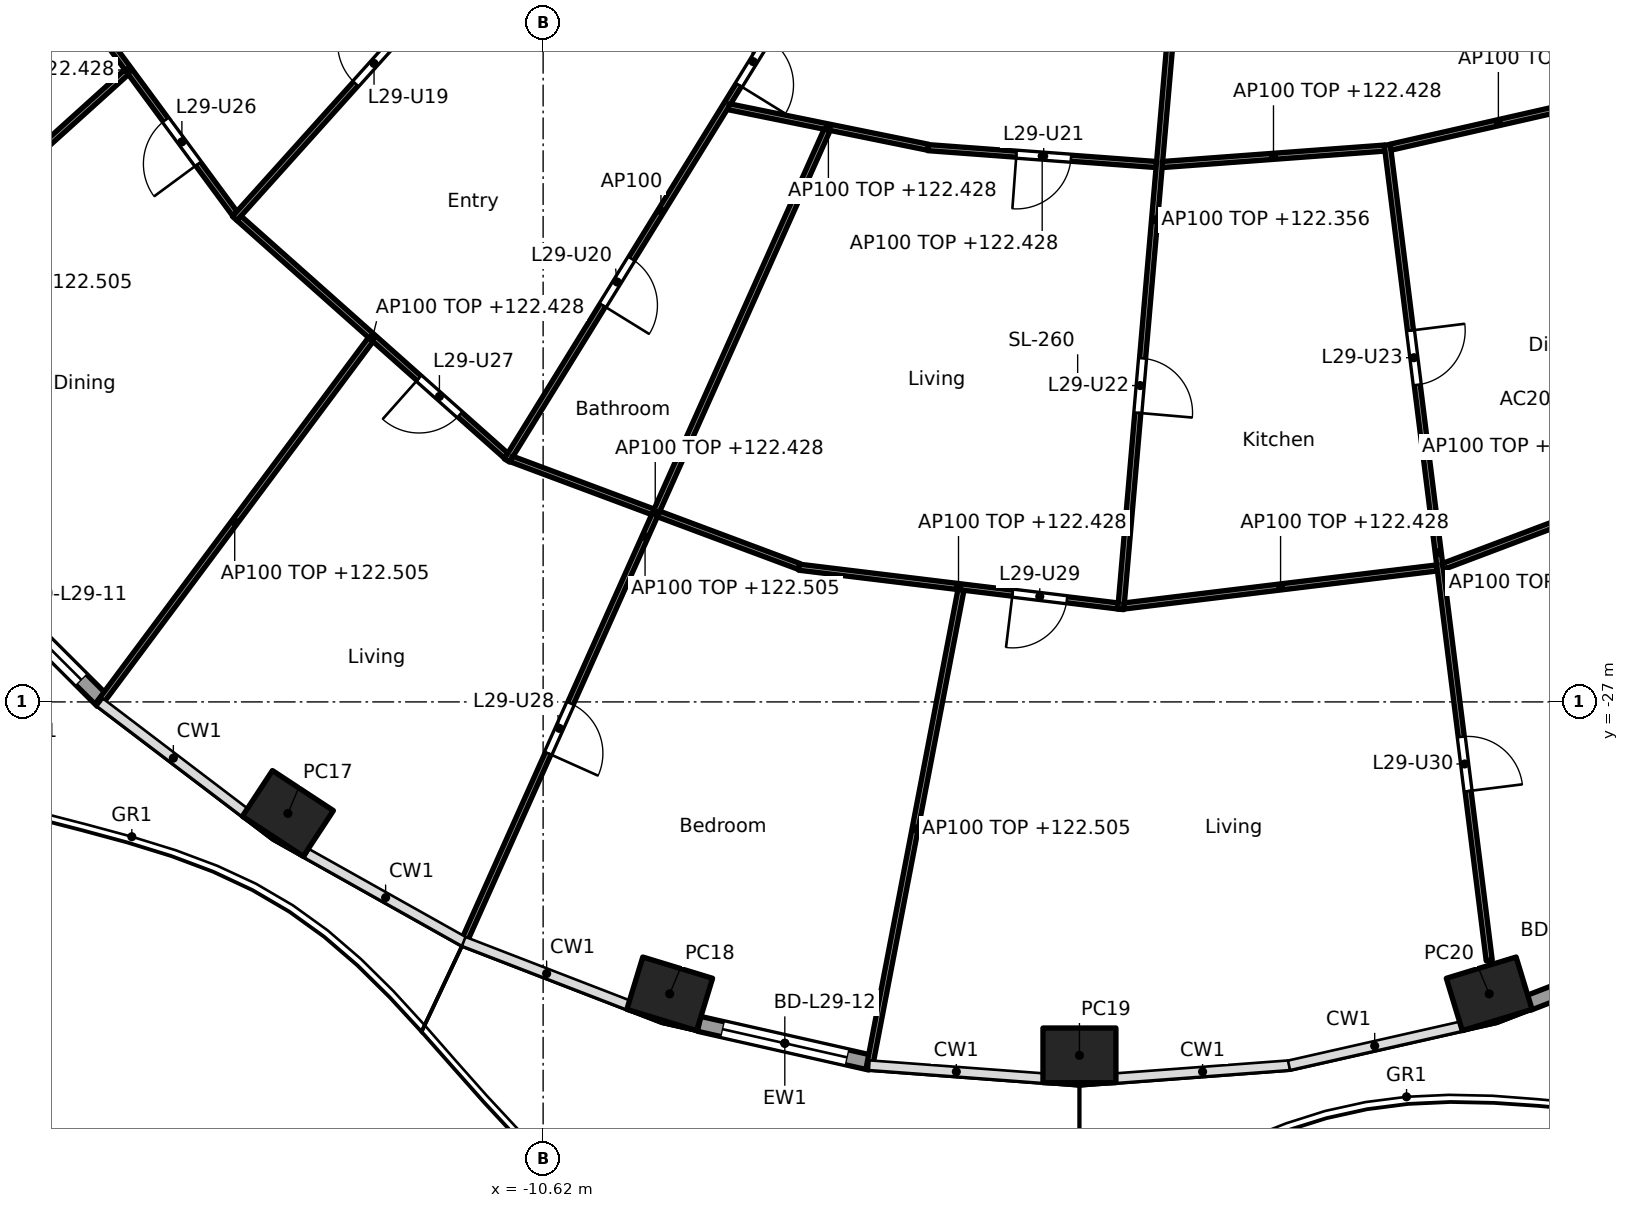
"""IFC4 building model, lengths in metres.
Left out: names, types, materials, properties, quantities, classifications, styles, units other than length and angle.
Written with IfcOpenShell. Run it as: python <this file> out.ifc"""

import sys

from ifc_helpers import new_model, si_unit, direction, frame, frame_2d, origin, origin_2d, place, context, subcontext, project, spatial, rectangle, hollow_rectangle, extrude, element, fill, save


model = new_model("IFC4")
c1 = context("Model", 3, precision=1e-05, world=origin(), true_north=direction((0.0, 1.0)))
c2 = subcontext(c1, "Body", "Model", "MODEL_VIEW")
j1 = project(units=[si_unit("LENGTHUNIT", "METRE"), si_unit("PLANEANGLEUNIT", "RADIAN")], contexts=[c1])
p1 = place(None, origin())
s1 = spatial("IfcSite", under=j1, at=p1, CompositionType="ELEMENT")
p2 = place(p1, origin())
s2 = spatial("IfcBuilding", under=s1, at=p2, CompositionType="ELEMENT")
p3 = place(p2, frame((0.0, 0.0, 119.6)))
s3 = spatial("IfcBuildingStorey", under=s2, at=p3, CompositionType="ELEMENT", Elevation=119.6)
for number, where, z_axis, x_axis in (
    (1, (-14.817, -28.834, -0.26), (0.0, 0.0, 1.0), (0.836, -0.549, 0.0)),
    (2, (-8.538, -31.801, -0.26), (0.0, 0.0, 1.0), (0.957, -0.292, 0.0)),
    (3, (-1.8, -32.813, -0.26), (0.0, 0.0, 1.0), (1.0, 0.0, 0.0)),
    (4, (4.938, -31.801, -0.26), (0.0, 0.0, 1.0), (0.957, 0.292, 0.0)),
):
    element("IfcColumn", number, at=place(p3, frame(where, z_axis=z_axis, x_axis=x_axis)), inside=s3, PredefinedType="COLUMN", context=c2, shape_type="SweptSolid", body=[
        extrude(hollow_rectangle(XDim=1.2, YDim=0.9, WallThickness=0.04, at=origin_2d()), origin(), (0.0, 0.0, 1.0), 3.96),
    ])
p4 = place(p3, frame((-17.865, -26.985, 0.0), z_axis=(0.0, 0.0, 1.0), x_axis=(-0.707818274975, 0.706394570768, 0.0)))
e5 = element("IfcWall", 5, at=p4, inside=s3, PredefinedType="SOLIDWALL", context=c2, shape_type="SweptSolid", body=[
    extrude(rectangle(XDim=3.087, YDim=0.25, at=frame_2d((1.543, 0.0))), origin(), (0.0, 0.0, 1.0), 3.44),
])
p5 = place(p4, frame((0.493, 0.0, 0.0)))
e6 = element("IfcOpeningElement", 6, at=p5, cuts=e5, PredefinedType="OPENING", context=c2, shape_type="SweptSolid", body=[
    extrude(rectangle(XDim=2.1, YDim=2.4, at=frame_2d((1.05, 1.2))), frame((0.0, 0.135, 0.0), z_axis=(0.0, -1.0, 0.0), x_axis=(1.0, 0.0, 0.0)), (0.0, 0.0, 1.0), 0.27),
])
p6 = place(p3, frame((-5.236, -32.932, 0.0), z_axis=(0.0, 0.0, 1.0), x_axis=(-0.975339035722, 0.220711951186, 0.0)))
e7 = element("IfcWall", 7, at=p6, inside=s3, PredefinedType="SOLIDWALL", context=c2, shape_type="SweptSolid", body=[
    extrude(rectangle(XDim=2.89, YDim=0.25, at=frame_2d((1.445, 0.0))), origin(), (0.0, 0.0, 1.0), 3.44),
])
p7 = place(p6, frame((0.395, 0.0, 0.0)))
e8 = element("IfcOpeningElement", 8, at=p7, cuts=e7, PredefinedType="OPENING", context=c2, shape_type="SweptSolid", body=[
    extrude(rectangle(XDim=2.1, YDim=2.4, at=frame_2d((1.05, 1.2))), frame((0.0, 0.135, 0.0), z_axis=(0.0, -1.0, 0.0), x_axis=(1.0, 0.0, 0.0)), (0.0, 0.0, 1.0), 0.27),
])
p8 = place(p3, frame((8.31, -30.898, 0.0), z_axis=(0.0, 0.0, 1.0), x_axis=(-0.932845344347, -0.360277064952, 0.0)))
e9 = element("IfcWall", 9, at=p8, inside=s3, PredefinedType="SOLIDWALL", context=c2, shape_type="SweptSolid", body=[
    extrude(rectangle(XDim=2.923, YDim=0.25, at=frame_2d((1.462, 0.0))), origin(), (0.0, 0.0, 1.0), 3.44),
])
p9 = place(p8, frame((0.412, 0.0, 0.0)))
e10 = element("IfcOpeningElement", 10, at=p9, cuts=e9, PredefinedType="OPENING", context=c2, shape_type="SweptSolid", body=[
    extrude(rectangle(XDim=2.1, YDim=2.4, at=frame_2d((1.05, 1.2))), frame((0.0, 0.135, 0.0), z_axis=(0.0, -1.0, 0.0), x_axis=(1.0, 0.0, 0.0)), (0.0, 0.0, 1.0), 0.27),
])
p10 = place(p3, frame((-19.176, -14.244, 0.0), z_axis=(0.0, 0.0, 1.0), x_axis=(0.593532053206, -0.80481035146, 0.0)))
e11 = element("IfcWall", 11, at=p10, inside=s3, PredefinedType="PARTITIONING", context=c2, shape_type="SweptSolid", body=[
    extrude(rectangle(XDim=5.876, YDim=0.1, at=frame_2d((2.938, 0.0))), origin(), (0.0, 0.0, 1.0), 2.828),
])
p11 = place(p10, frame((3.957, 0.0, 0.0)))
e12 = element("IfcOpeningElement", 12, at=p11, cuts=e11, PredefinedType="OPENING", context=c2, shape_type="SweptSolid", body=[
    extrude(rectangle(XDim=0.9, YDim=2.1, at=frame_2d((0.45, 1.05))), frame((0.0, 0.06, 0.0), z_axis=(0.0, -1.0, 0.0), x_axis=(1.0, 0.0, 0.0)), (0.0, 0.0, 1.0), 0.12),
])
p12 = place(p3, frame((-17.47, -16.642, 0.0), z_axis=(0.0, 0.0, 1.0), x_axis=(-0.742345465337, -0.670017320742, 0.0)))
e13 = element("IfcWall", 13, at=p12, inside=s3, PredefinedType="PARTITIONING", context=c2, shape_type="SweptSolid", body=[
    extrude(rectangle(XDim=7.21, YDim=0.1, at=frame_2d((3.605, 0.0))), origin(), (0.0, 0.0, 1.0), 2.905),
])
p13 = place(p3, frame((-7.725, -10.186, 0.0), z_axis=(0.0, 0.0, 1.0), x_axis=(-0.668498346565, -0.743713628112, 0.0)))
e14 = element("IfcWall", 14, at=p13, inside=s3, PredefinedType="PARTITIONING", context=c2, shape_type="SweptSolid", body=[
    extrude(rectangle(XDim=11.919, YDim=0.1, at=frame_2d((5.959, 0.0))), origin(), (0.0, 0.0, 1.0), 2.756),
])
p14 = place(p13, frame((2.106, 0.0, 0.0)))
e15 = element("IfcOpeningElement", 15, at=p14, cuts=e14, PredefinedType="OPENING", context=c2, shape_type="SweptSolid", body=[
    extrude(rectangle(XDim=0.9, YDim=2.1, at=frame_2d((0.45, 1.05))), frame((0.0, 0.06, 0.0), z_axis=(0.0, -1.0, 0.0), x_axis=(1.0, 0.0, 0.0)), (0.0, 0.0, 1.0), 0.12),
])
p15 = place(p13, frame((8.041, 0.0, 0.0)))
e16 = element("IfcOpeningElement", 16, at=p15, cuts=e14, PredefinedType="OPENING", context=c2, shape_type="SweptSolid", body=[
    extrude(rectangle(XDim=0.9, YDim=2.1, at=frame_2d((0.45, 1.05))), frame((0.0, 0.06, 0.0), z_axis=(0.0, -1.0, 0.0), x_axis=(1.0, 0.0, 0.0)), (0.0, 0.0, 1.0), 0.12),
])
p16 = place(p3, frame((-15.622, -19.046, 0.0), z_axis=(0.0, 0.0, 1.0), x_axis=(0.747342891849, -0.664438561496, 0.0)))
e17 = element("IfcWall", 17, at=p16, inside=s3, PredefinedType="PARTITIONING", context=c2, shape_type="SweptSolid", body=[
    extrude(rectangle(XDim=5.881, YDim=0.1, at=frame_2d((2.94, 0.0))), origin(), (0.0, 0.0, 1.0), 2.828),
])
p17 = place(p16, frame((3.961, 0.0, 0.0)))
e18 = element("IfcOpeningElement", 18, at=p17, cuts=e17, PredefinedType="OPENING", context=c2, shape_type="SweptSolid", body=[
    extrude(rectangle(XDim=0.9, YDim=2.1, at=frame_2d((0.45, 1.05))), frame((0.0, 0.06, 0.0), z_axis=(0.0, -1.0, 0.0), x_axis=(1.0, 0.0, 0.0)), (0.0, 0.0, 1.0), 0.12),
])
p18 = place(p3, frame((-13.454, -21.04, 0.0), z_axis=(0.0, 0.0, 1.0), x_axis=(-0.597848033124, -0.801609461826, 0.0)))
e19 = element("IfcWall", 19, at=p18, inside=s3, PredefinedType="PARTITIONING", context=c2, shape_type="SweptSolid", body=[
    extrude(rectangle(XDim=7.486, YDim=0.1, at=frame_2d((3.743, 0.0))), origin(), (0.0, 0.0, 1.0), 2.905),
])
p19 = place(p3, frame((-6.149, -14.825, 0.0), z_axis=(0.0, 0.0, 1.0), x_axis=(-0.525396393596, -0.850857584791, 0.0)))
e20 = element("IfcWall", 20, at=p19, inside=s3, PredefinedType="PARTITIONING", context=c2, shape_type="SweptSolid", body=[
    extrude(rectangle(XDim=9.643, YDim=0.1, at=frame_2d((4.822, 0.0))), origin(), (0.0, 0.0, 1.0), 3.44),
])
p20 = place(p19, frame((1.485, 0.0, 0.0)))
e21 = element("IfcOpeningElement", 21, at=p20, cuts=e20, PredefinedType="OPENING", context=c2, shape_type="SweptSolid", body=[
    extrude(rectangle(XDim=0.9, YDim=2.1, at=frame_2d((0.45, 1.05))), frame((0.0, 0.06, 0.0), z_axis=(0.0, -1.0, 0.0), x_axis=(1.0, 0.0, 0.0)), (0.0, 0.0, 1.0), 0.12),
])
p21 = place(p19, frame((5.744, 0.0, 0.0)))
e22 = element("IfcOpeningElement", 22, at=p21, cuts=e20, PredefinedType="OPENING", context=c2, shape_type="SweptSolid", body=[
    extrude(rectangle(XDim=0.9, YDim=2.1, at=frame_2d((0.45, 1.05))), frame((0.0, 0.06, 0.0), z_axis=(0.0, -1.0, 0.0), x_axis=(1.0, 0.0, 0.0)), (0.0, 0.0, 1.0), 0.12),
])
p22 = place(p3, frame((-7.568, -17.212, 0.0), z_axis=(0.0, 0.0, 1.0), x_axis=(0.979967079473, -0.199159541946, 0.0)))
e23 = element("IfcWall", 23, at=p22, inside=s3, PredefinedType="PARTITIONING", context=c2, shape_type="SweptSolid", body=[
    extrude(rectangle(XDim=3.347, YDim=0.1, at=frame_2d((1.673, 0.0))), origin(), (0.0, 0.0, 1.0), 2.828),
])
p23 = place(p3, frame((-11.143, -23.004, 0.0), z_axis=(0.0, 0.0, 1.0), x_axis=(0.936721765635, -0.350074754567, 0.0)))
e24 = element("IfcWall", 24, at=p23, inside=s3, PredefinedType="PARTITIONING", context=c2, shape_type="SweptSolid", body=[
    extrude(rectangle(XDim=5.053, YDim=0.1, at=frame_2d((2.526, 0.0))), origin(), (0.0, 0.0, 1.0), 2.828),
])
p24 = place(p3, frame((-5.949, -17.591, 0.0), z_axis=(0.0, 0.0, 1.0), x_axis=(-0.40838467696, -0.912809923053, 0.0)))
e25 = element("IfcWall", 25, at=p24, inside=s3, PredefinedType="PARTITIONING", context=c2, shape_type="SweptSolid", body=[
    extrude(rectangle(XDim=14.665, YDim=0.1, at=frame_2d((7.333, 0.0))), origin(), (0.0, 0.0, 1.0), 2.905),
])
p25 = place(p24, frame((10.334, 0.0, 0.0)))
e26 = element("IfcOpeningElement", 26, at=p25, cuts=e25, PredefinedType="OPENING", context=c2, shape_type="SweptSolid", body=[
    extrude(rectangle(XDim=0.9, YDim=2.1, at=frame_2d((0.45, 1.05))), frame((0.0, 0.06, 0.0), z_axis=(0.0, -1.0, 0.0), x_axis=(1.0, 0.0, 0.0)), (0.0, 0.0, 1.0), 0.12),
])
p26 = place(p3, frame((-4.29, -17.885, 0.0), z_axis=(0.0, 0.0, 1.0), x_axis=(0.997272353708, -0.073809569363, 0.0)))
e27 = element("IfcWall", 27, at=p26, inside=s3, PredefinedType="PARTITIONING", context=c2, shape_type="SweptSolid", body=[
    extrude(rectangle(XDim=3.764, YDim=0.1, at=frame_2d((1.882, 0.0))), origin(), (0.0, 0.0, 1.0), 2.828),
])
p27 = place(p26, frame((1.457, 0.0, 0.0)))
e28 = element("IfcOpeningElement", 28, at=p27, cuts=e27, PredefinedType="OPENING", context=c2, shape_type="SweptSolid", body=[
    extrude(rectangle(XDim=0.9, YDim=2.1, at=frame_2d((0.45, 1.05))), frame((0.0, 0.06, 0.0), z_axis=(0.0, -1.0, 0.0), x_axis=(1.0, 0.0, 0.0)), (0.0, 0.0, 1.0), 0.12),
])
p28 = place(p3, frame((-6.413, -24.784, 0.0), z_axis=(0.0, 0.0, 1.0), x_axis=(0.992690077723, -0.120691381588, 0.0)))
e29 = element("IfcWall", 29, at=p28, inside=s3, PredefinedType="PARTITIONING", context=c2, shape_type="SweptSolid", body=[
    extrude(rectangle(XDim=5.286, YDim=0.1, at=frame_2d((2.643, 0.0))), origin(), (0.0, 0.0, 1.0), 2.828),
])
p29 = place(p28, frame((3.539, 0.0, 0.0)))
e30 = element("IfcOpeningElement", 30, at=p29, cuts=e29, PredefinedType="OPENING", context=c2, shape_type="SweptSolid", body=[
    extrude(rectangle(XDim=0.9, YDim=2.1, at=frame_2d((0.45, 1.05))), frame((0.0, 0.06, 0.0), z_axis=(0.0, -1.0, 0.0), x_axis=(1.0, 0.0, 0.0)), (0.0, 0.0, 1.0), 0.12),
])
p30 = place(p3, frame((-3.749, -25.159, 0.0), z_axis=(0.0, 0.0, 1.0), x_axis=(-0.188392334675, -0.982093848996, 0.0)))
e31 = element("IfcWall", 31, at=p30, inside=s3, PredefinedType="PARTITIONING", context=c2, shape_type="SweptSolid", body=[
    extrude(rectangle(XDim=8.0, YDim=0.1, at=frame_2d((4.0, 0.0))), origin(), (0.0, 0.0, 1.0), 2.905),
])
p31 = place(p3, frame((-0.009, -12.664, 0.0), z_axis=(0.0, 0.0, 1.0), x_axis=(-0.086441225464, -0.996256952066, 0.0)))
e32 = element("IfcWall", 32, at=p31, inside=s3, PredefinedType="PARTITIONING", context=c2, shape_type="SweptSolid", body=[
    extrude(rectangle(XDim=12.862, YDim=0.1, at=frame_2d((6.431, 0.0))), origin(), (0.0, 0.0, 1.0), 2.756),
])
p32 = place(p31, frame((2.312, 0.0, 0.0)))
e33 = element("IfcOpeningElement", 33, at=p32, cuts=e32, PredefinedType="OPENING", context=c2, shape_type="SweptSolid", body=[
    extrude(rectangle(XDim=0.9, YDim=2.1, at=frame_2d((0.45, 1.05))), frame((0.0, 0.06, 0.0), z_axis=(0.0, -1.0, 0.0), x_axis=(1.0, 0.0, 0.0)), (0.0, 0.0, 1.0), 0.12),
])
p33 = place(p31, frame((8.718, 0.0, 0.0)))
e34 = element("IfcOpeningElement", 34, at=p33, cuts=e32, PredefinedType="OPENING", context=c2, shape_type="SweptSolid", body=[
    extrude(rectangle(XDim=0.9, YDim=2.1, at=frame_2d((0.45, 1.05))), frame((0.0, 0.06, 0.0), z_axis=(0.0, -1.0, 0.0), x_axis=(1.0, 0.0, 0.0)), (0.0, 0.0, 1.0), 0.12),
])
p34 = place(p3, frame((-0.436, -18.163, 0.0), z_axis=(0.0, 0.0, 1.0), x_axis=(0.997271025958, 0.073827506966, 0.0)))
e35 = element("IfcWall", 35, at=p34, inside=s3, PredefinedType="PARTITIONING", context=c2, shape_type="SweptSolid", body=[
    extrude(rectangle(XDim=3.664, YDim=0.1, at=frame_2d((1.832, 0.0))), origin(), (0.0, 0.0, 1.0), 2.828),
])
p35 = place(p3, frame((-1.066, -25.422, 0.0), z_axis=(0.0, 0.0, 1.0), x_axis=(0.992692993044, 0.120667400577, 0.0)))
e36 = element("IfcWall", 36, at=p35, inside=s3, PredefinedType="PARTITIONING", context=c2, shape_type="SweptSolid", body=[
    extrude(rectangle(XDim=5.186, YDim=0.1, at=frame_2d((2.593, 0.0))), origin(), (0.0, 0.0, 1.0), 2.828),
])
p36 = place(p3, frame((3.262, -17.839, 0.0), z_axis=(0.0, 0.0, 1.0), x_axis=(0.124074750982, -0.992272873845, 0.0)))
e37 = element("IfcWall", 37, at=p36, inside=s3, PredefinedType="PARTITIONING", context=c2, shape_type="SweptSolid", body=[
    extrude(rectangle(XDim=13.516, YDim=0.1, at=frame_2d((6.758, 0.0))), origin(), (0.0, 0.0, 1.0), 2.828),
])
p37 = place(p36, frame((3.078, 0.0, 0.0)))
e38 = element("IfcOpeningElement", 38, at=p37, cuts=e37, PredefinedType="OPENING", context=c2, shape_type="SweptSolid", body=[
    extrude(rectangle(XDim=0.9, YDim=2.1, at=frame_2d((0.45, 1.05))), frame((0.0, 0.06, 0.0), z_axis=(0.0, -1.0, 0.0), x_axis=(1.0, 0.0, 0.0)), (0.0, 0.0, 1.0), 0.12),
])
p38 = place(p36, frame((9.811, 0.0, 0.0)))
e39 = element("IfcOpeningElement", 39, at=p38, cuts=e37, PredefinedType="OPENING", context=c2, shape_type="SweptSolid", body=[
    extrude(rectangle(XDim=0.9, YDim=2.1, at=frame_2d((0.45, 1.05))), frame((0.0, 0.06, 0.0), z_axis=(0.0, -1.0, 0.0), x_axis=(1.0, 0.0, 0.0)), (0.0, 0.0, 1.0), 0.12),
])
p39 = place(p3, frame((3.317, -17.878, 0.0), z_axis=(0.0, 0.0, 1.0), x_axis=(0.975095905288, 0.221783623135, 0.0)))
e40 = element("IfcWall", 40, at=p39, inside=s3, PredefinedType="PARTITIONING", context=c2, shape_type="SweptSolid", body=[
    extrude(rectangle(XDim=3.636, YDim=0.1, at=frame_2d((1.818, 0.0))), origin(), (0.0, 0.0, 1.0), 2.828),
])
p40 = place(p3, frame((4.178, -24.773, 0.0), z_axis=(0.0, 0.0, 1.0), x_axis=(0.935583811437, 0.353104703702, 0.0)))
e41 = element("IfcWall", 41, at=p40, inside=s3, PredefinedType="PARTITIONING", context=c2, shape_type="SweptSolid", body=[
    extrude(rectangle(XDim=5.184, YDim=0.1, at=frame_2d((2.592, 0.0))), origin(), (0.0, 0.0, 1.0), 2.828),
])
p41 = place(p5, origin())
e42 = element("IfcDoor", 42, at=p41, inside=s3, OperationType="SLIDING_TO_LEFT", PredefinedType="DOOR", context=c2, shape_type="SweptSolid", body=[
    extrude(rectangle(XDim=2.1, YDim=2.4, at=frame_2d((1.05, 1.2))), frame((0.0, 0.025, 0.0), z_axis=(0.0, -1.0, 0.0), x_axis=(1.0, 0.0, 0.0)), (0.0, 0.0, 1.0), 0.05),
])
fill(e6, e42)
p42 = place(p7, origin())
e43 = element("IfcDoor", 43, at=p42, inside=s3, OperationType="SLIDING_TO_LEFT", PredefinedType="DOOR", context=c2, shape_type="SweptSolid", body=[
    extrude(rectangle(XDim=2.1, YDim=2.4, at=frame_2d((1.05, 1.2))), frame((0.0, 0.025, 0.0), z_axis=(0.0, -1.0, 0.0), x_axis=(1.0, 0.0, 0.0)), (0.0, 0.0, 1.0), 0.05),
])
fill(e8, e43)
p43 = place(p20, origin())
e44 = element("IfcDoor", 44, at=p43, inside=s3, OperationType="SINGLE_SWING_RIGHT", PredefinedType="DOOR", context=c2, shape_type="SweptSolid", body=[
    extrude(rectangle(XDim=0.9, YDim=2.1, at=frame_2d((0.45, 1.05))), frame((0.0, 0.025, 0.0), z_axis=(0.0, -1.0, 0.0), x_axis=(1.0, 0.0, 0.0)), (0.0, 0.0, 1.0), 0.05),
])
fill(e21, e44)
p44 = place(p15, frame((0.9, 0.0, 0.0), x_axis=(-1.0, 0.0, 0.0)))
e45 = element("IfcDoor", 45, at=p44, inside=s3, OperationType="SINGLE_SWING_RIGHT", PredefinedType="DOOR", context=c2, shape_type="SweptSolid", body=[
    extrude(rectangle(XDim=0.9, YDim=2.1, at=frame_2d((0.45, 1.05))), frame((0.0, 0.025, 0.0), z_axis=(0.0, -1.0, 0.0), x_axis=(1.0, 0.0, 0.0)), (0.0, 0.0, 1.0), 0.05),
])
fill(e16, e45)
p45 = place(p21, origin())
e46 = element("IfcDoor", 46, at=p45, inside=s3, OperationType="SINGLE_SWING_RIGHT", PredefinedType="DOOR", context=c2, shape_type="SweptSolid", body=[
    extrude(rectangle(XDim=0.9, YDim=2.1, at=frame_2d((0.45, 1.05))), frame((0.0, 0.025, 0.0), z_axis=(0.0, -1.0, 0.0), x_axis=(1.0, 0.0, 0.0)), (0.0, 0.0, 1.0), 0.05),
])
fill(e22, e46)
p46 = place(p27, frame((0.9, 0.0, 0.0), x_axis=(-1.0, 0.0, 0.0)))
e47 = element("IfcDoor", 47, at=p46, inside=s3, OperationType="SINGLE_SWING_RIGHT", PredefinedType="DOOR", context=c2, shape_type="SweptSolid", body=[
    extrude(rectangle(XDim=0.9, YDim=2.1, at=frame_2d((0.45, 1.05))), frame((0.0, 0.025, 0.0), z_axis=(0.0, -1.0, 0.0), x_axis=(1.0, 0.0, 0.0)), (0.0, 0.0, 1.0), 0.05),
])
fill(e28, e47)
p47 = place(p33, origin())
e48 = element("IfcDoor", 48, at=p47, inside=s3, OperationType="SINGLE_SWING_RIGHT", PredefinedType="DOOR", context=c2, shape_type="SweptSolid", body=[
    extrude(rectangle(XDim=0.9, YDim=2.1, at=frame_2d((0.45, 1.05))), frame((0.0, 0.025, 0.0), z_axis=(0.0, -1.0, 0.0), x_axis=(1.0, 0.0, 0.0)), (0.0, 0.0, 1.0), 0.05),
])
fill(e34, e48)
p48 = place(p37, origin())
e49 = element("IfcDoor", 49, at=p48, inside=s3, OperationType="SINGLE_SWING_LEFT", PredefinedType="DOOR", context=c2, shape_type="SweptSolid", body=[
    extrude(rectangle(XDim=0.9, YDim=2.1, at=frame_2d((0.45, 1.05))), frame((0.0, 0.025, 0.0), z_axis=(0.0, -1.0, 0.0), x_axis=(1.0, 0.0, 0.0)), (0.0, 0.0, 1.0), 0.05),
])
fill(e38, e49)
p49 = place(p11, frame((0.9, 0.0, 0.0), x_axis=(-1.0, 0.0, 0.0)))
e50 = element("IfcDoor", 50, at=p49, inside=s3, OperationType="SINGLE_SWING_LEFT", PredefinedType="DOOR", context=c2, shape_type="SweptSolid", body=[
    extrude(rectangle(XDim=0.9, YDim=2.1, at=frame_2d((0.45, 1.05))), frame((0.0, 0.025, 0.0), z_axis=(0.0, -1.0, 0.0), x_axis=(1.0, 0.0, 0.0)), (0.0, 0.0, 1.0), 0.05),
])
fill(e12, e50)
p50 = place(p17, frame((0.9, 0.0, 0.0), x_axis=(-1.0, 0.0, 0.0)))
e51 = element("IfcDoor", 51, at=p50, inside=s3, OperationType="SINGLE_SWING_RIGHT", PredefinedType="DOOR", context=c2, shape_type="SweptSolid", body=[
    extrude(rectangle(XDim=0.9, YDim=2.1, at=frame_2d((0.45, 1.05))), frame((0.0, 0.025, 0.0), z_axis=(0.0, -1.0, 0.0), x_axis=(1.0, 0.0, 0.0)), (0.0, 0.0, 1.0), 0.05),
])
fill(e18, e51)
p51 = place(p25, origin())
e52 = element("IfcDoor", 52, at=p51, inside=s3, OperationType="SINGLE_SWING_RIGHT", PredefinedType="DOOR", context=c2, shape_type="SweptSolid", body=[
    extrude(rectangle(XDim=0.9, YDim=2.1, at=frame_2d((0.45, 1.05))), frame((0.0, 0.025, 0.0), z_axis=(0.0, -1.0, 0.0), x_axis=(1.0, 0.0, 0.0)), (0.0, 0.0, 1.0), 0.05),
])
fill(e26, e52)
p52 = place(p29, frame((0.9, 0.0, 0.0), x_axis=(-1.0, 0.0, 0.0)))
e53 = element("IfcDoor", 53, at=p52, inside=s3, OperationType="SINGLE_SWING_RIGHT", PredefinedType="DOOR", context=c2, shape_type="SweptSolid", body=[
    extrude(rectangle(XDim=0.9, YDim=2.1, at=frame_2d((0.45, 1.05))), frame((0.0, 0.025, 0.0), z_axis=(0.0, -1.0, 0.0), x_axis=(1.0, 0.0, 0.0)), (0.0, 0.0, 1.0), 0.05),
])
fill(e30, e53)
p53 = place(p38, origin())
e54 = element("IfcDoor", 54, at=p53, inside=s3, OperationType="SINGLE_SWING_RIGHT", PredefinedType="DOOR", context=c2, shape_type="SweptSolid", body=[
    extrude(rectangle(XDim=0.9, YDim=2.1, at=frame_2d((0.45, 1.05))), frame((0.0, 0.025, 0.0), z_axis=(0.0, -1.0, 0.0), x_axis=(1.0, 0.0, 0.0)), (0.0, 0.0, 1.0), 0.05),
])
fill(e39, e54)
save(model, sys.argv[1])
